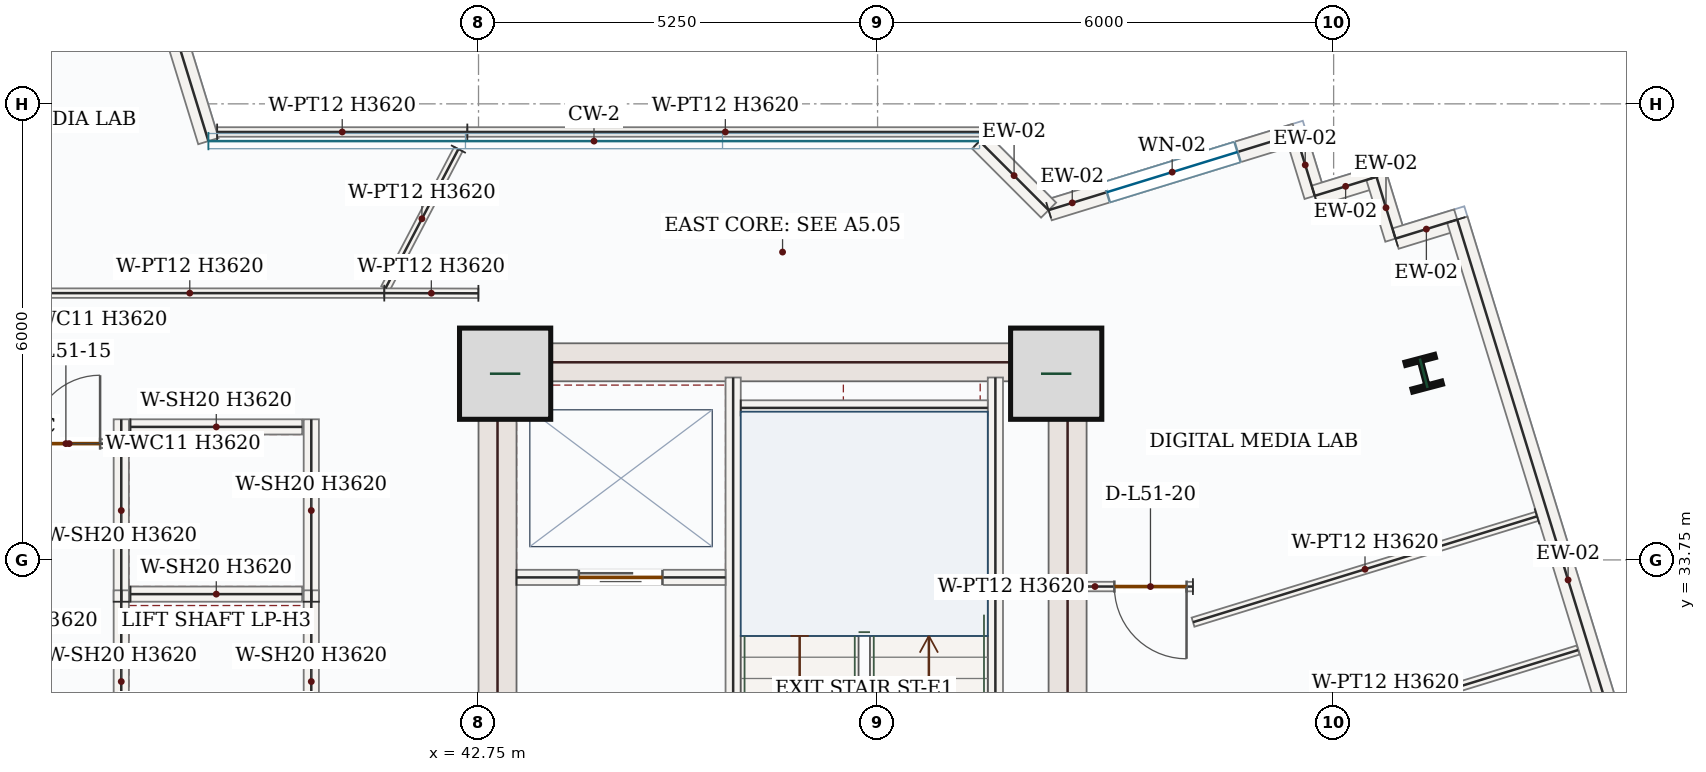
"""IFC4 building model, lengths in metres.
Left out: names, types, materials, properties, quantities, classifications, styles, units other than length and angle.
Written with IfcOpenShell. Run it as: python <this file> out.ifc"""

import sys

from ifc_helpers import new_model, si_unit, direction, frame, frame_2d, origin, origin_2d, place, context, subcontext, project, spatial, rectangle, i_section, extrude, source, transform, mapped, element, fill, save


model = new_model("IFC4")
c1 = context("Model", 3, precision=1e-05, world=origin(), true_north=direction((0.0, 1.0)))
c2 = subcontext(c1, "Body", "Model", "MODEL_VIEW")
j1 = project(units=[si_unit("LENGTHUNIT", "METRE"), si_unit("PLANEANGLEUNIT", "RADIAN")], contexts=[c1])
p1 = place(None, origin())
s1 = spatial("IfcSite", under=j1, at=p1, CompositionType="ELEMENT")
p2 = place(p1, origin())
s2 = spatial("IfcBuilding", under=s1, at=p2, CompositionType="ELEMENT")
p3 = place(p2, frame((0.0, 0.0, 217.5)))
s3 = spatial("IfcBuildingStorey", under=s2, at=p3, CompositionType="ELEMENT", Elevation=217.5)
p4 = place(p3, frame((43.0, 28.05, 0.0), z_axis=(0.0, 0.0, 1.0), x_axis=(0.0, 1.0, 0.0)))
e1 = element("IfcWall", 1, at=p4, inside=s3, PredefinedType="SHEAR", context=c2, shape_type="SweptSolid", body=[
    extrude(rectangle(XDim=8.55, YDim=0.5, at=frame_2d((4.275, 0.0))), origin(), (0.0, 0.0, 1.0), 3.62),
])
p5 = place(p4, frame((1.5, 0.0, 0.0)))
e2 = element("IfcOpeningElement", 2, at=p5, cuts=e1, PredefinedType="OPENING", context=c2, shape_type="SweptSolid", body=[
    extrude(rectangle(XDim=1.1, YDim=2.2, at=frame_2d((0.55, 1.1))), frame((0.0, 0.26, 0.0), z_axis=(0.0, -1.0, 0.0), x_axis=(1.0, 0.0, 0.0)), (0.0, 0.0, 1.0), 0.52),
])
m1 = source(origin(), c2, "Body", "SweptSolid", [
    extrude(rectangle(XDim=8.55, YDim=0.5, at=frame_2d((4.275, 0.0))), origin(), (0.0, 0.0, 1.0), 3.62),
])
p6 = place(p3, frame((50.5, 28.05, 0.0), z_axis=(0.0, 0.0, 1.0), x_axis=(0.0, 1.0, 0.0)))
e3 = element("IfcWall", 3, at=p6, inside=s3, PredefinedType="SHEAR", context=c2, shape_type="MappedRepresentation", body=[
    mapped(m1, transform((0.0, 0.0, 0.0), x_axis=(1.0, 0.0, 0.0), y_axis=(0.0, 1.0, 0.0), z_axis=(0.0, 0.0, 1.0), scale=1.0)),
])
m2 = source(origin(), c2, "Body", "SweptSolid", [
    extrude(rectangle(XDim=7.0, YDim=0.5, at=frame_2d((3.5, 0.0))), origin(), (0.0, 0.0, 1.0), 3.62),
])
p7 = place(p3, frame((43.25, 36.35, 0.0), z_axis=(0.0, 0.0, 1.0), x_axis=(1.0, 0.0, 0.0)))
e4 = element("IfcWall", 4, at=p7, inside=s3, PredefinedType="SHEAR", context=c2, shape_type="MappedRepresentation", body=[
    mapped(m2, transform((0.0, 0.0, 0.0), x_axis=(1.0, 0.0, 0.0), y_axis=(0.0, 1.0, 0.0), z_axis=(0.0, 0.0, 1.0), scale=1.0)),
])
m3 = source(origin(), c2, "Body", "SweptSolid", [
    extrude(rectangle(XDim=1.2, YDim=1.2, at=origin_2d()), origin(), (0.0, 0.0, 1.0), 3.9),
])
for number, where, z_axis, x_axis in (
    (5, (43.1, 36.2, 0.0), (0.0, 0.0, 1.0), (1.0, 0.0, 0.0)),
    (6, (50.35, 36.2, 0.0), (0.0, 0.0, 1.0), (1.0, 0.0, 0.0)),
):
    element("IfcColumn", number, at=place(p3, frame(where, z_axis=z_axis, x_axis=x_axis)), inside=s3, PredefinedType="COLUMN", context=c2, shape_type="MappedRepresentation", body=[
        mapped(m3, transform((0.0, 0.0, 0.0), x_axis=(1.0, 0.0, 0.0), y_axis=(0.0, 1.0, 0.0), z_axis=(0.0, 0.0, 1.0), scale=1.0)),
    ])
m4 = source(origin(), c2, "Body", "SweptSolid", [
    extrude(i_section(OverallWidth=0.404, OverallDepth=0.407, WebThickness=0.027, FlangeThickness=0.044, FilletRadius=0.018, at=origin_2d()), origin(), (0.0, 0.0, 1.0), 3.9),
])
p8 = place(p3, frame((55.185, 36.206, 0.0), z_axis=(0.0, 0.0, 1.0), x_axis=(0.966823388604, 0.255445757936, 0.0)))
e7 = element("IfcColumn", 7, at=p8, inside=s3, PredefinedType="COLUMN", context=c2, shape_type="MappedRepresentation", body=[
    mapped(m4, transform((0.0, 0.0, 0.0), x_axis=(1.0, 0.0, 0.0), y_axis=(0.0, 1.0, 0.0), z_axis=(0.0, 0.0, 1.0), scale=1.0)),
])
p9 = place(p3, frame((50.25, 38.352, 0.0), z_axis=(0.0, 0.0, 1.0), x_axis=(0.955782111839, 0.294075763519, 0.0)))
e8 = element("IfcWall", 8, at=p9, inside=s3, PredefinedType="SOLIDWALL", context=c2, shape_type="SweptSolid", body=[
    extrude(rectangle(XDim=3.402, YDim=0.28, at=frame_2d((1.701, 0.0))), origin(), (0.0, 0.0, 1.0), 3.62),
])
p10 = place(p9, frame((0.801, 0.0, 0.85)))
e9 = element("IfcOpeningElement", 9, at=p10, cuts=e8, PredefinedType="OPENING", context=c2, shape_type="SweptSolid", body=[
    extrude(rectangle(XDim=1.8, YDim=1.75, at=frame_2d((0.9, 0.875))), frame((0.0, 0.15, 0.0), z_axis=(0.0, -1.0, 0.0), x_axis=(1.0, 0.0, 0.0)), (0.0, 0.0, 1.0), 0.3),
])
m5 = source(origin(), c2, "Body", "SweptSolid", [
    extrude(rectangle(XDim=0.85, YDim=0.28, at=frame_2d((0.425, 0.0))), origin(), (0.0, 0.0, 1.0), 3.62),
])
for number, where, z_axis, x_axis in (
    (10, (53.502, 39.352, 0.0), (0.0, 0.0, 1.0), (0.294, -0.956, 0.0)),
    (11, (53.751, 38.54, 0.0), (0.0, 0.0, 1.0), (0.956, 0.294, 0.0)),
    (12, (54.564, 38.79, 0.0), (0.0, 0.0, 1.0), (0.294, -0.956, 0.0)),
    (13, (54.814, 37.977, 0.0), (0.0, 0.0, 1.0), (0.956, 0.294, 0.0)),
):
    element("IfcWall", number, at=place(p3, frame(where, z_axis=z_axis, x_axis=x_axis)), inside=s3, PredefinedType="SOLIDWALL", context=c2, shape_type="MappedRepresentation", body=[
        mapped(m5, transform((0.0, 0.0, 0.0), x_axis=(1.0, 0.0, 0.0), y_axis=(0.0, 1.0, 0.0), z_axis=(0.0, 0.0, 1.0), scale=1.0)),
    ])
m6 = source(origin(), c2, "Body", "SweptSolid", [
    extrude(rectangle(XDim=9.92, YDim=0.28, at=frame_2d((4.96, 0.0))), origin(), (0.0, 0.0, 1.0), 3.62),
])
p11 = place(p3, frame((55.626, 38.227, 0.0), z_axis=(0.0, 0.0, 1.0), x_axis=(0.294028777175, -0.955796567368, 0.0)))
e14 = element("IfcWall", 14, at=p11, inside=s3, PredefinedType="SOLIDWALL", context=c2, shape_type="MappedRepresentation", body=[
    mapped(m6, transform((0.0, 0.0, 0.0), x_axis=(1.0, 0.0, 0.0), y_axis=(0.0, 1.0, 0.0), z_axis=(0.0, 0.0, 1.0), scale=1.0)),
])
m7 = source(origin(), c2, "Body", "SweptSolid", [
    extrude(rectangle(XDim=8.582, YDim=0.28, at=frame_2d((4.291, 0.0))), origin(), (0.0, 0.0, 1.0), 3.62),
])
p12 = place(p3, frame((36.673, 47.462, 0.0), z_axis=(0.0, 0.0, 1.0), x_axis=(0.294019877333, -0.955799305154, 0.0)))
e15 = element("IfcWall", 15, at=p12, inside=s3, PredefinedType="SOLIDWALL", context=c2, shape_type="MappedRepresentation", body=[
    mapped(m7, transform((0.0, 0.0, 0.0), x_axis=(1.0, 0.0, 0.0), y_axis=(0.0, 1.0, 0.0), z_axis=(0.0, 0.0, 1.0), scale=1.0)),
])
m8 = source(origin(), c2, "Body", "SweptSolid", [
    extrude(rectangle(XDim=1.284, YDim=0.28, at=frame_2d((0.642, 0.0))), origin(), (0.0, 0.0, 1.0), 3.62),
])
p13 = place(p3, frame((49.342, 39.26, 0.0), z_axis=(0.0, 0.0, 1.0), x_axis=(0.707011720788, -0.707201828807, 0.0)))
e16 = element("IfcWall", 16, at=p13, inside=s3, PredefinedType="SOLIDWALL", context=c2, shape_type="MappedRepresentation", body=[
    mapped(m8, transform((0.0, 0.0, 0.0), x_axis=(1.0, 0.0, 0.0), y_axis=(0.0, 1.0, 0.0), z_axis=(0.0, 0.0, 1.0), scale=1.0)),
])
m9 = source(origin(), c2, "Body", "SweptSolid", [
    extrude(rectangle(XDim=7.87, YDim=0.2, at=frame_2d((3.935, 0.0))), origin(), (0.0, 0.0, 1.0), 3.62),
])
p14 = place(p3, frame((49.55, 28.28, 0.0), z_axis=(0.0, 0.0, 1.0), x_axis=(0.0, 1.0, 0.0)))
e17 = element("IfcWall", 17, at=p14, inside=s3, PredefinedType="SOLIDWALL", context=c2, shape_type="MappedRepresentation", body=[
    mapped(m9, transform((0.0, 0.0, 0.0), x_axis=(1.0, 0.0, 0.0), y_axis=(0.0, 1.0, 0.0), z_axis=(0.0, 0.0, 1.0), scale=1.0)),
])
p15 = place(p3, frame((46.1, 28.15, 0.0), z_axis=(0.0, 0.0, 1.0), x_axis=(0.0, 1.0, 0.0)))
e18 = element("IfcWall", 18, at=p15, inside=s3, PredefinedType="SOLIDWALL", context=c2, shape_type="SweptSolid", body=[
    extrude(rectangle(XDim=8.0, YDim=0.2, at=frame_2d((4.0, 0.0))), origin(), (0.0, 0.0, 1.0), 3.62),
])
p16 = place(p15, frame((0.4, 0.0, 0.0)))
e19 = element("IfcOpeningElement", 19, at=p16, cuts=e18, PredefinedType="OPENING", context=c2, shape_type="SweptSolid", body=[
    extrude(rectangle(XDim=1.05, YDim=2.15, at=frame_2d((0.525, 1.075))), frame((0.0, 0.11, 0.0), z_axis=(0.0, -1.0, 0.0), x_axis=(1.0, 0.0, 0.0)), (0.0, 0.0, 1.0), 0.22),
])
m10 = source(origin(), c2, "Body", "SweptSolid", [
    extrude(rectangle(XDim=3.25, YDim=0.2, at=frame_2d((1.625, 0.0))), origin(), (0.0, 0.0, 1.0), 3.62),
])
p17 = place(p3, frame((46.2, 35.75, 0.0), z_axis=(0.0, 0.0, 1.0), x_axis=(1.0, 0.0, 0.0)))
e20 = element("IfcWall", 20, at=p17, inside=s3, PredefinedType="SOLIDWALL", context=c2, shape_type="MappedRepresentation", body=[
    mapped(m10, transform((0.0, 0.0, 0.0), x_axis=(1.0, 0.0, 0.0), y_axis=(0.0, 1.0, 0.0), z_axis=(0.0, 0.0, 1.0), scale=1.0)),
])
p18 = place(p3, frame((43.25, 33.52, 0.0), z_axis=(0.0, 0.0, 1.0), x_axis=(1.0, 0.0, 0.0)))
e21 = element("IfcWall", 21, at=p18, inside=s3, PredefinedType="SOLIDWALL", context=c2, shape_type="SweptSolid", body=[
    extrude(rectangle(XDim=2.75, YDim=0.2, at=frame_2d((1.375, 0.0))), origin(), (0.0, 0.0, 1.0), 3.62),
])
p19 = place(p18, frame((0.82, 0.0, 0.0)))
e22 = element("IfcOpeningElement", 22, at=p19, cuts=e21, PredefinedType="OPENING", context=c2, shape_type="SweptSolid", body=[
    extrude(rectangle(XDim=1.1, YDim=2.15, at=frame_2d((0.55, 1.075))), frame((0.0, 0.11, 0.0), z_axis=(0.0, -1.0, 0.0), x_axis=(1.0, 0.0, 0.0)), (0.0, 0.0, 1.0), 0.22),
])
m11 = source(origin(), c2, "Body", "SweptSolid", [
    extrude(rectangle(XDim=2.4, YDim=0.2, at=frame_2d((1.2, 0.0))), origin(), (0.0, 0.0, 1.0), 3.62),
])
for number, where, z_axis, x_axis in (
    (23, (38.05, 33.2, 0.0), (0.0, 0.0, 1.0), (0.0, 1.0, 0.0)),
    (24, (40.55, 33.2, 0.0), (0.0, 0.0, 1.0), (0.0, 1.0, 0.0)),
):
    element("IfcWall", number, at=place(p3, frame(where, z_axis=z_axis, x_axis=x_axis)), inside=s3, PredefinedType="SOLIDWALL", context=c2, shape_type="MappedRepresentation", body=[
        mapped(m11, transform((0.0, 0.0, 0.0), x_axis=(1.0, 0.0, 0.0), y_axis=(0.0, 1.0, 0.0), z_axis=(0.0, 0.0, 1.0), scale=1.0)),
    ])
m12 = source(origin(), c2, "Body", "SweptSolid", [
    extrude(rectangle(XDim=2.26, YDim=0.2, at=frame_2d((1.13, 0.0))), origin(), (0.0, 0.0, 1.0), 3.62),
])
for number, where, z_axis, x_axis in (
    (25, (38.17, 33.3, 0.0), (0.0, 0.0, 1.0), (1.0, 0.0, 0.0)),
    (26, (38.17, 35.5, 0.0), (0.0, 0.0, 1.0), (1.0, 0.0, 0.0)),
):
    element("IfcWall", number, at=place(p3, frame(where, z_axis=z_axis, x_axis=x_axis)), inside=s3, PredefinedType="SOLIDWALL", context=c2, shape_type="MappedRepresentation", body=[
        mapped(m12, transform((0.0, 0.0, 0.0), x_axis=(1.0, 0.0, 0.0), y_axis=(0.0, 1.0, 0.0), z_axis=(0.0, 0.0, 1.0), scale=1.0)),
    ])
for number, where, z_axis, x_axis in (
    (27, (38.05, 30.95, 0.0), (0.0, 0.0, 1.0), (0.0, 1.0, 0.0)),
    (28, (40.55, 30.95, 0.0), (0.0, 0.0, 1.0), (0.0, 1.0, 0.0)),
):
    element("IfcWall", number, at=place(p3, frame(where, z_axis=z_axis, x_axis=x_axis)), inside=s3, PredefinedType="SOLIDWALL", context=c2, shape_type="MappedRepresentation", body=[
        mapped(m11, transform((0.0, 0.0, 0.0), x_axis=(1.0, 0.0, 0.0), y_axis=(0.0, 1.0, 0.0), z_axis=(0.0, 0.0, 1.0), scale=1.0)),
    ])
p20 = place(p3, frame((36.782, 35.28, 0.0), z_axis=(0.0, 0.0, 1.0), x_axis=(1.0, 0.0, 0.0)))
e29 = element("IfcWall", 29, at=p20, inside=s3, PredefinedType="PARTITIONING", context=c2, shape_type="SweptSolid", body=[
    extrude(rectangle(XDim=1.163, YDim=0.115, at=frame_2d((0.581, 0.0))), origin(), (0.0, 0.0, 1.0), 3.62),
])
p21 = place(p20, frame((0.089, 0.0, 0.0)))
e30 = element("IfcOpeningElement", 30, at=p21, cuts=e29, PredefinedType="OPENING", context=c2, shape_type="SweptSolid", body=[
    extrude(rectangle(XDim=0.9, YDim=2.1, at=frame_2d((0.45, 1.05))), frame((0.0, 0.067, 0.0), z_axis=(0.0, -1.0, 0.0), x_axis=(1.0, 0.0, 0.0)), (0.0, 0.0, 1.0), 0.135),
])
p22 = place(p3, frame((41.51, 37.26, 0.0), z_axis=(0.0, 0.0, 1.0), x_axis=(-1.0, 0.0, 0.0)))
e31 = element("IfcWall", 31, at=p22, inside=s3, PredefinedType="PARTITIONING", context=c2, shape_type="SweptSolid", body=[
    extrude(rectangle(XDim=7.704, YDim=0.125, at=frame_2d((3.852, 0.0))), origin(), (0.0, 0.0, 1.0), 3.62),
])
p23 = place(p22, frame((5.268, 0.0, 0.0)))
e32 = element("IfcOpeningElement", 32, at=p23, cuts=e31, PredefinedType="OPENING", context=c2, shape_type="SweptSolid", body=[
    extrude(rectangle(XDim=0.95, YDim=2.15, at=frame_2d((0.475, 1.075))), frame((0.0, 0.073, 0.0), z_axis=(0.0, -1.0, 0.0), x_axis=(1.0, 0.0, 0.0)), (0.0, 0.0, 1.0), 0.145),
])
m13 = source(origin(), c2, "Body", "SweptSolid", [
    extrude(rectangle(XDim=3.292, YDim=0.125, at=frame_2d((1.646, 0.0))), origin(), (0.0, 0.0, 1.0), 3.62),
])
p24 = place(p3, frame((39.311, 39.38, 0.0), z_axis=(0.0, 0.0, 1.0), x_axis=(1.0, 0.0, 0.0)))
e33 = element("IfcWall", 33, at=p24, inside=s3, PredefinedType="PARTITIONING", context=c2, shape_type="MappedRepresentation", body=[
    mapped(m13, transform((0.0, 0.0, 0.0), x_axis=(1.0, 0.0, 0.0), y_axis=(0.0, 1.0, 0.0), z_axis=(0.0, 0.0, 1.0), scale=1.0)),
])
m14 = source(origin(), c2, "Body", "SweptSolid", [
    extrude(rectangle(XDim=2.069, YDim=0.125, at=frame_2d((1.035, 0.0))), origin(), (0.0, 0.0, 1.0), 3.62),
])
p25 = place(p3, frame((42.485, 39.155, 0.0), z_axis=(0.0, 0.0, 1.0), x_axis=(-0.46379536588, -0.885942356244, 0.0)))
e34 = element("IfcWall", 34, at=p25, inside=s3, PredefinedType="PARTITIONING", context=c2, shape_type="MappedRepresentation", body=[
    mapped(m14, transform((0.0, 0.0, 0.0), x_axis=(1.0, 0.0, 0.0), y_axis=(0.0, 1.0, 0.0), z_axis=(0.0, 0.0, 1.0), scale=1.0)),
])
m15 = source(origin(), c2, "Body", "SweptSolid", [
    extrude(rectangle(XDim=5.301, YDim=0.125, at=frame_2d((2.651, 0.0))), origin(), (0.0, 0.0, 1.0), 3.62),
])
p26 = place(p3, frame((52.15, 31.006, 0.0), z_axis=(0.0, 0.0, 1.0), x_axis=(0.955789961274, 0.294050250686, 0.0)))
e35 = element("IfcWall", 35, at=p26, inside=s3, PredefinedType="PARTITIONING", context=c2, shape_type="MappedRepresentation", body=[
    mapped(m15, transform((0.0, 0.0, 0.0), x_axis=(1.0, 0.0, 0.0), y_axis=(0.0, 1.0, 0.0), z_axis=(0.0, 0.0, 1.0), scale=1.0)),
])
m16 = source(origin(), c2, "Body", "SweptSolid", [
    extrude(rectangle(XDim=1.238, YDim=0.125, at=frame_2d((0.619, 0.0))), origin(), (0.0, 0.0, 1.0), 3.62),
])
p27 = place(p3, frame((42.748, 37.257, 0.0), z_axis=(0.0, 0.0, 1.0), x_axis=(-0.9999976473, 0.002169192293, 0.0)))
e36 = element("IfcWall", 36, at=p27, inside=s3, PredefinedType="PARTITIONING", context=c2, shape_type="MappedRepresentation", body=[
    mapped(m16, transform((0.0, 0.0, 0.0), x_axis=(1.0, 0.0, 0.0), y_axis=(0.0, 1.0, 0.0), z_axis=(0.0, 0.0, 1.0), scale=1.0)),
])
m17 = source(origin(), c2, "Body", "SweptSolid", [
    extrude(rectangle(XDim=6.789, YDim=0.125, at=frame_2d((3.395, 0.0))), origin(), (0.0, 0.0, 1.0), 3.62),
])
p28 = place(p3, frame((42.603, 39.38, 0.0), z_axis=(0.0, 0.0, 1.0), x_axis=(1.0, 0.0, 0.0)))
e37 = element("IfcWall", 37, at=p28, inside=s3, PredefinedType="PARTITIONING", context=c2, shape_type="MappedRepresentation", body=[
    mapped(m17, transform((0.0, 0.0, 0.0), x_axis=(1.0, 0.0, 0.0), y_axis=(0.0, 1.0, 0.0), z_axis=(0.0, 0.0, 1.0), scale=1.0)),
])
m18 = source(origin(), c2, "Body", "SweptSolid", [
    extrude(rectangle(XDim=4.735, YDim=0.125, at=frame_2d((2.368, 0.0))), origin(), (0.0, 0.0, 1.0), 3.62),
])
p29 = place(p3, frame((56.676, 34.323, 0.0), z_axis=(0.0, 0.0, 1.0), x_axis=(-0.955793499711, -0.294038748994, 0.0)))
e38 = element("IfcWall", 38, at=p29, inside=s3, PredefinedType="PARTITIONING", context=c2, shape_type="MappedRepresentation", body=[
    mapped(m18, transform((0.0, 0.0, 0.0), x_axis=(1.0, 0.0, 0.0), y_axis=(0.0, 1.0, 0.0), z_axis=(0.0, 0.0, 1.0), scale=1.0)),
])
p30 = place(p3, frame((52.149, 33.399, 0.0), z_axis=(0.0, 0.0, 1.0), x_axis=(-0.999999754632, 0.000700525222, 0.0)))
e39 = element("IfcWall", 39, at=p30, inside=s3, PredefinedType="PARTITIONING", context=c2, shape_type="SweptSolid", body=[
    extrude(rectangle(XDim=1.394, YDim=0.125, at=frame_2d((0.697, 0.0))), origin(), (0.0, 0.0, 1.0), 3.62),
])
p31 = place(p30, frame((0.084, 0.0, 0.0)))
e40 = element("IfcOpeningElement", 40, at=p31, cuts=e39, PredefinedType="OPENING", context=c2, shape_type="SweptSolid", body=[
    extrude(rectangle(XDim=0.95, YDim=2.15, at=frame_2d((0.475, 1.075))), frame((0.0, 0.073, 0.0), z_axis=(0.0, -1.0, 0.0), x_axis=(1.0, 0.0, 0.0)), (0.0, 0.0, 1.0), 0.145),
])
m19 = source(origin(), c2, "Body", "SweptSolid", [
    extrude(rectangle(XDim=1.8, YDim=1.75, at=frame_2d((0.9, 0.875))), frame((0.0, 0.03, 0.0), z_axis=(0.0, -1.0, 0.0), x_axis=(1.0, 0.0, 0.0)), (0.0, 0.0, 1.0), 0.06),
])
p32 = place(p10, origin())
e41 = element("IfcWindow", 41, at=p32, inside=s3, PartitioningType="DOUBLE_PANEL_VERTICAL", PredefinedType="WINDOW", context=c2, shape_type="MappedRepresentation", body=[
    mapped(m19, transform((0.0, 0.0, 0.0), x_axis=(1.0, 0.0, 0.0), y_axis=(0.0, 1.0, 0.0), z_axis=(0.0, 0.0, 1.0), scale=1.0)),
])
fill(e9, e41)
m20 = source(origin(), c2, "Body", "SweptSolid", [
    extrude(rectangle(XDim=1.1, YDim=2.15, at=frame_2d((0.55, 1.075))), frame((0.0, 0.025, 0.0), z_axis=(0.0, -1.0, 0.0), x_axis=(1.0, 0.0, 0.0)), (0.0, 0.0, 1.0), 0.05),
])
p33 = place(p19, origin())
e42 = element("IfcDoor", 42, at=p33, inside=s3, OperationType="DOUBLE_DOOR_SLIDING", PredefinedType="DOOR", context=c2, shape_type="MappedRepresentation", body=[
    mapped(m20, transform((0.0, 0.0, 0.0), x_axis=(1.0, 0.0, 0.0), y_axis=(0.0, 1.0, 0.0), z_axis=(0.0, 0.0, 1.0), scale=1.0)),
])
fill(e22, e42)
m21 = source(origin(), c2, "Body", "SweptSolid", [
    extrude(rectangle(XDim=0.9, YDim=2.1, at=frame_2d((0.45, 1.05))), frame((0.0, 0.025, 0.0), z_axis=(0.0, -1.0, 0.0), x_axis=(1.0, 0.0, 0.0)), (0.0, 0.0, 1.0), 0.05),
])
p34 = place(p21, origin())
e43 = element("IfcDoor", 43, at=p34, inside=s3, OperationType="SINGLE_SWING_RIGHT", PredefinedType="DOOR", context=c2, shape_type="MappedRepresentation", body=[
    mapped(m21, transform((0.0, 0.0, 0.0), x_axis=(1.0, 0.0, 0.0), y_axis=(0.0, 1.0, 0.0), z_axis=(0.0, 0.0, 1.0), scale=1.0)),
])
fill(e30, e43)
m22 = source(origin(), c2, "Body", "SweptSolid", [
    extrude(rectangle(XDim=0.95, YDim=2.15, at=frame_2d((0.475, 1.075))), frame((0.0, 0.025, 0.0), z_axis=(0.0, -1.0, 0.0), x_axis=(1.0, 0.0, 0.0)), (0.0, 0.0, 1.0), 0.05),
])
p35 = place(p31, origin())
e44 = element("IfcDoor", 44, at=p35, inside=s3, OperationType="SINGLE_SWING_LEFT", PredefinedType="DOOR", context=c2, shape_type="MappedRepresentation", body=[
    mapped(m22, transform((0.0, 0.0, 0.0), x_axis=(1.0, 0.0, 0.0), y_axis=(0.0, 1.0, 0.0), z_axis=(0.0, 0.0, 1.0), scale=1.0)),
])
fill(e40, e44)
save(model, sys.argv[1])
